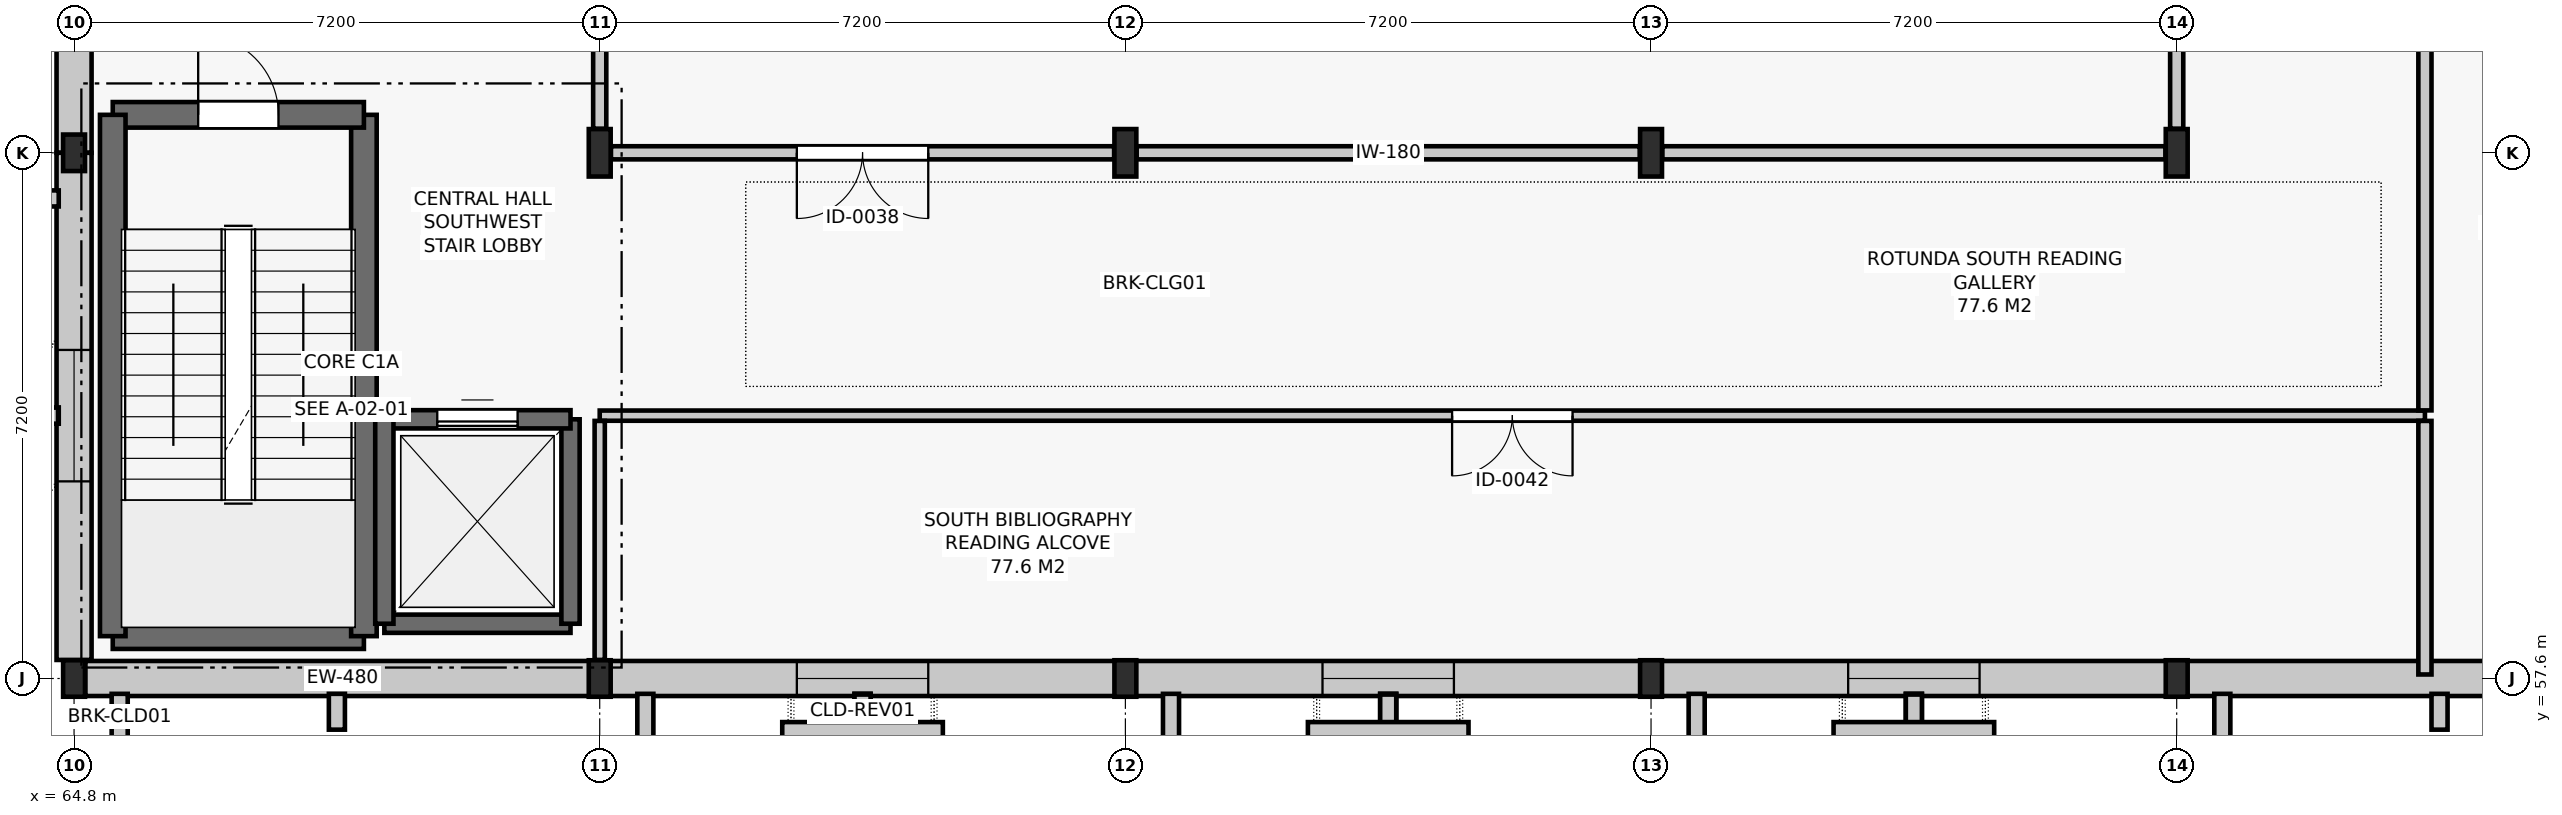
"""IFC4 building model, lengths in metres.
Left out: names, types, materials, properties, quantities, classifications, styles, units other than length and angle.
Written with IfcOpenShell. Run it as: python <this file> out.ifc"""

import sys

from ifc_helpers import new_model, si_unit, direction, frame, frame_2d, origin, origin_2d, place, context, subcontext, project, spatial, rectangle, i_section, extrude, element, fill, save


model = new_model("IFC4")
c1 = context("Model", 3, precision=1e-05, world=origin(), true_north=direction((0.0, 1.0)))
c2 = subcontext(c1, "Body", "Model", "MODEL_VIEW")
j1 = project(units=[si_unit("LENGTHUNIT", "METRE"), si_unit("PLANEANGLEUNIT", "RADIAN")], contexts=[c1])
p1 = place(None, origin())
s1 = spatial("IfcSite", under=j1, at=p1, CompositionType="ELEMENT")
p2 = place(p1, origin())
s2 = spatial("IfcBuilding", under=s1, at=p2, CompositionType="ELEMENT")
p3 = place(p2, frame((0.0, 0.0, 5.4)))
s3 = spatial("IfcBuildingStorey", under=s2, at=p3, CompositionType="ELEMENT", Elevation=5.4)
for number, where, z_axis, x_axis in (
    (1, (64.8, 57.6, 0.0), (0.0, 0.0, 1.0), (1.0, 0.0, 0.0)),
    (2, (64.8, 64.8, 0.0), (0.0, 0.0, 1.0), (1.0, 0.0, 0.0)),
    (3, (72.0, 57.6, 0.0), (0.0, 0.0, 1.0), (1.0, 0.0, 0.0)),
):
    element("IfcColumn", number, at=place(p3, frame(where, z_axis=z_axis, x_axis=x_axis)), inside=s3, PredefinedType="COLUMN", context=c2, shape_type="SweptSolid", body=[
        extrude(i_section(OverallWidth=0.3, OverallDepth=0.5, WebThickness=0.014, FlangeThickness=0.028, FilletRadius=0.027, at=origin_2d()), origin(), (0.0, 0.0, 1.0), 4.8),
    ])
p4 = place(p3, frame((72.0, 64.8, 0.0), z_axis=(0.0, 0.0, 1.0), x_axis=(1.0, 0.0, 0.0)))
e4 = element("IfcColumn", 4, at=p4, inside=s3, PredefinedType="COLUMN", context=c2, shape_type="SweptSolid", body=[
    extrude(i_section(OverallWidth=0.3, OverallDepth=0.65, WebThickness=0.016, FlangeThickness=0.031, FilletRadius=0.027, at=origin_2d()), origin(), (0.0, 0.0, 1.0), 4.8),
])
p5 = place(p3, frame((79.2, 57.6, 0.0), z_axis=(0.0, 0.0, 1.0), x_axis=(1.0, 0.0, 0.0)))
e5 = element("IfcColumn", 5, at=p5, inside=s3, PredefinedType="COLUMN", context=c2, shape_type="SweptSolid", body=[
    extrude(i_section(OverallWidth=0.3, OverallDepth=0.5, WebThickness=0.014, FlangeThickness=0.028, FilletRadius=0.027, at=origin_2d()), origin(), (0.0, 0.0, 1.0), 4.8),
])
p6 = place(p3, frame((79.2, 64.8, 0.0), z_axis=(0.0, 0.0, 1.0), x_axis=(1.0, 0.0, 0.0)))
e6 = element("IfcColumn", 6, at=p6, inside=s3, PredefinedType="COLUMN", context=c2, shape_type="SweptSolid", body=[
    extrude(i_section(OverallWidth=0.3, OverallDepth=0.65, WebThickness=0.016, FlangeThickness=0.031, FilletRadius=0.027, at=origin_2d()), origin(), (0.0, 0.0, 1.0), 4.8),
])
p7 = place(p3, frame((86.4, 57.6, 0.0), z_axis=(0.0, 0.0, 1.0), x_axis=(1.0, 0.0, 0.0)))
e7 = element("IfcColumn", 7, at=p7, inside=s3, PredefinedType="COLUMN", context=c2, shape_type="SweptSolid", body=[
    extrude(i_section(OverallWidth=0.3, OverallDepth=0.5, WebThickness=0.014, FlangeThickness=0.028, FilletRadius=0.027, at=origin_2d()), origin(), (0.0, 0.0, 1.0), 4.8),
])
p8 = place(p3, frame((86.4, 64.8, 0.0), z_axis=(0.0, 0.0, 1.0), x_axis=(1.0, 0.0, 0.0)))
e8 = element("IfcColumn", 8, at=p8, inside=s3, PredefinedType="COLUMN", context=c2, shape_type="SweptSolid", body=[
    extrude(i_section(OverallWidth=0.3, OverallDepth=0.65, WebThickness=0.016, FlangeThickness=0.031, FilletRadius=0.027, at=origin_2d()), origin(), (0.0, 0.0, 1.0), 4.8),
])
p9 = place(p3, frame((93.6, 57.6, 0.0), z_axis=(0.0, 0.0, 1.0), x_axis=(1.0, 0.0, 0.0)))
e9 = element("IfcColumn", 9, at=p9, inside=s3, PredefinedType="COLUMN", context=c2, shape_type="SweptSolid", body=[
    extrude(i_section(OverallWidth=0.3, OverallDepth=0.5, WebThickness=0.014, FlangeThickness=0.028, FilletRadius=0.027, at=origin_2d()), origin(), (0.0, 0.0, 1.0), 4.8),
])
p10 = place(p3, frame((93.6, 64.8, 0.0), z_axis=(0.0, 0.0, 1.0), x_axis=(1.0, 0.0, 0.0)))
e10 = element("IfcColumn", 10, at=p10, inside=s3, PredefinedType="COLUMN", context=c2, shape_type="SweptSolid", body=[
    extrude(i_section(OverallWidth=0.3, OverallDepth=0.65, WebThickness=0.016, FlangeThickness=0.031, FilletRadius=0.027, at=origin_2d()), origin(), (0.0, 0.0, 1.0), 4.8),
])
p11 = place(p3, frame((64.954, 57.6, 0.0), z_axis=(0.0, 0.0, 1.0), x_axis=(1.0, 0.0, 0.0)))
e11 = element("IfcWall", 11, at=p11, inside=s3, PredefinedType="SOLIDWALL", context=c2, shape_type="SweptSolid", body=[
    extrude(rectangle(XDim=7.046, YDim=0.48, at=frame_2d((3.523, 0.0))), origin(), (0.0, 0.0, 1.0), 3.8),
])
p12 = place(p3, frame((72.0, 57.6, 0.0), z_axis=(0.0, 0.0, 1.0), x_axis=(1.0, 0.0, 0.0)))
e12 = element("IfcWall", 12, at=p12, inside=s3, PredefinedType="SOLIDWALL", context=c2, shape_type="SweptSolid", body=[
    extrude(rectangle(XDim=7.2, YDim=0.48, at=frame_2d((3.6, 0.0))), origin(), (0.0, 0.0, 1.0), 3.8),
])
p13 = place(p12, frame((2.7, 0.0, 0.9)))
e13 = element("IfcOpeningElement", 13, at=p13, cuts=e12, PredefinedType="OPENING", context=c2, shape_type="SweptSolid", body=[
    extrude(rectangle(XDim=1.8, YDim=2.45, at=frame_2d((0.9, 1.225))), frame((0.0, 0.252, 0.0), z_axis=(0.0, -1.0, 0.0), x_axis=(1.0, 0.0, 0.0)), (0.0, 0.0, 1.0), 0.504),
])
p14 = place(p3, frame((79.2, 57.6, 0.0), z_axis=(0.0, 0.0, 1.0), x_axis=(1.0, 0.0, 0.0)))
e14 = element("IfcWall", 14, at=p14, inside=s3, PredefinedType="SOLIDWALL", context=c2, shape_type="SweptSolid", body=[
    extrude(rectangle(XDim=7.2, YDim=0.48, at=frame_2d((3.6, 0.0))), origin(), (0.0, 0.0, 1.0), 3.8),
])
p15 = place(p14, frame((2.7, 0.0, 0.9)))
e15 = element("IfcOpeningElement", 15, at=p15, cuts=e14, PredefinedType="OPENING", context=c2, shape_type="SweptSolid", body=[
    extrude(rectangle(XDim=1.8, YDim=2.45, at=frame_2d((0.9, 1.225))), frame((0.0, 0.252, 0.0), z_axis=(0.0, -1.0, 0.0), x_axis=(1.0, 0.0, 0.0)), (0.0, 0.0, 1.0), 0.504),
])
p16 = place(p3, frame((86.4, 57.6, 0.0), z_axis=(0.0, 0.0, 1.0), x_axis=(1.0, 0.0, 0.0)))
e16 = element("IfcWall", 16, at=p16, inside=s3, PredefinedType="SOLIDWALL", context=c2, shape_type="SweptSolid", body=[
    extrude(rectangle(XDim=7.2, YDim=0.48, at=frame_2d((3.6, 0.0))), origin(), (0.0, 0.0, 1.0), 3.8),
])
p17 = place(p16, frame((2.7, 0.0, 0.9)))
e17 = element("IfcOpeningElement", 17, at=p17, cuts=e16, PredefinedType="OPENING", context=c2, shape_type="SweptSolid", body=[
    extrude(rectangle(XDim=1.8, YDim=2.45, at=frame_2d((0.9, 1.225))), frame((0.0, 0.252, 0.0), z_axis=(0.0, -1.0, 0.0), x_axis=(1.0, 0.0, 0.0)), (0.0, 0.0, 1.0), 0.504),
])
p18 = place(p3, frame((93.6, 57.6, 0.0), z_axis=(0.0, 0.0, 1.0), x_axis=(1.0, 0.0, 0.0)))
e18 = element("IfcWall", 18, at=p18, inside=s3, PredefinedType="SOLIDWALL", context=c2, shape_type="SweptSolid", body=[
    extrude(rectangle(XDim=7.046, YDim=0.48, at=frame_2d((3.523, 0.0))), origin(), (0.0, 0.0, 1.0), 3.8),
])
p19 = place(p3, frame((64.8, 72.0, 0.0), z_axis=(0.0, 0.0, 1.0), x_axis=(0.0, -1.0, 0.0)))
e19 = element("IfcWall", 19, at=p19, inside=s3, PredefinedType="SOLIDWALL", context=c2, shape_type="SweptSolid", body=[
    extrude(rectangle(XDim=7.2, YDim=0.48, at=frame_2d((3.6, 0.0))), origin(), (0.0, 0.0, 1.0), 3.8),
])
p20 = place(p19, frame((2.7, 0.0, 0.9)))
e20 = element("IfcOpeningElement", 20, at=p20, cuts=e19, PredefinedType="OPENING", context=c2, shape_type="SweptSolid", body=[
    extrude(rectangle(XDim=1.8, YDim=2.45, at=frame_2d((0.9, 1.225))), frame((0.0, 0.252, 0.0), z_axis=(0.0, -1.0, 0.0), x_axis=(1.0, 0.0, 0.0)), (0.0, 0.0, 1.0), 0.504),
])
p21 = place(p3, frame((64.8, 64.8, 0.0), z_axis=(0.0, 0.0, 1.0), x_axis=(0.0, -1.0, 0.0)))
e21 = element("IfcWall", 21, at=p21, inside=s3, PredefinedType="SOLIDWALL", context=c2, shape_type="SweptSolid", body=[
    extrude(rectangle(XDim=6.946, YDim=0.48, at=frame_2d((3.473, 0.0))), origin(), (0.0, 0.0, 1.0), 3.8),
])
p22 = place(p21, frame((2.7, 0.0, 0.9)))
e22 = element("IfcOpeningElement", 22, at=p22, cuts=e21, PredefinedType="OPENING", context=c2, shape_type="SweptSolid", body=[
    extrude(rectangle(XDim=1.8, YDim=2.45, at=frame_2d((0.9, 1.225))), frame((0.0, 0.252, 0.0), z_axis=(0.0, -1.0, 0.0), x_axis=(1.0, 0.0, 0.0)), (0.0, 0.0, 1.0), 0.504),
])
p23 = place(p3, frame((65.33, 58.18, 0.0), z_axis=(0.0, 0.0, 1.0), x_axis=(1.0, 0.0, 0.0)))
e23 = element("IfcWall", 23, at=p23, inside=s3, PredefinedType="SHEAR", context=c2, shape_type="SweptSolid", body=[
    extrude(rectangle(XDim=3.44, YDim=0.35, at=frame_2d((1.72, 0.0))), origin(), (0.0, 0.0, 1.0), 4.52),
])
p24 = place(p3, frame((68.77, 58.18, 0.0), z_axis=(0.0, 0.0, 1.0), x_axis=(0.0, 1.0, 0.0)))
e24 = element("IfcWall", 24, at=p24, inside=s3, PredefinedType="SHEAR", context=c2, shape_type="SweptSolid", body=[
    extrude(rectangle(XDim=7.14, YDim=0.35, at=frame_2d((3.57, 0.0))), origin(), (0.0, 0.0, 1.0), 4.52),
])
p25 = place(p3, frame((68.77, 65.32, 0.0), z_axis=(0.0, 0.0, 1.0), x_axis=(-1.0, 0.0, 0.0)))
e25 = element("IfcWall", 25, at=p25, inside=s3, PredefinedType="SHEAR", context=c2, shape_type="SweptSolid", body=[
    extrude(rectangle(XDim=3.44, YDim=0.35, at=frame_2d((1.72, 0.0))), origin(), (0.0, 0.0, 1.0), 4.52),
])
p26 = place(p25, frame((1.17, 0.0, 0.0)))
e26 = element("IfcOpeningElement", 26, at=p26, cuts=e25, PredefinedType="OPENING", context=c2, shape_type="SweptSolid", body=[
    extrude(rectangle(XDim=1.1, YDim=2.15, at=frame_2d((0.55, 1.075))), frame((0.0, 0.187, 0.0), z_axis=(0.0, -1.0, 0.0), x_axis=(1.0, 0.0, 0.0)), (0.0, 0.0, 1.0), 0.374),
])
p27 = place(p3, frame((65.33, 65.32, 0.0), z_axis=(0.0, 0.0, 1.0), x_axis=(0.0, -1.0, 0.0)))
e27 = element("IfcWall", 27, at=p27, inside=s3, PredefinedType="SHEAR", context=c2, shape_type="SweptSolid", body=[
    extrude(rectangle(XDim=7.14, YDim=0.35, at=frame_2d((3.57, 0.0))), origin(), (0.0, 0.0, 1.0), 4.52),
])
p28 = place(p3, frame((69.05, 58.35, 0.0), z_axis=(0.0, 0.0, 1.0), x_axis=(1.0, 0.0, 0.0)))
e28 = element("IfcWall", 28, at=p28, inside=s3, PredefinedType="SHEAR", context=c2, shape_type="SweptSolid", body=[
    extrude(rectangle(XDim=2.55, YDim=0.25, at=frame_2d((1.275, 0.0))), origin(), (0.0, 0.0, 1.0), 4.52),
])
p29 = place(p3, frame((71.6, 58.35, 0.0), z_axis=(0.0, 0.0, 1.0), x_axis=(0.0, 1.0, 0.0)))
e29 = element("IfcWall", 29, at=p29, inside=s3, PredefinedType="SHEAR", context=c2, shape_type="SweptSolid", body=[
    extrude(rectangle(XDim=2.8, YDim=0.25, at=frame_2d((1.4, 0.0))), origin(), (0.0, 0.0, 1.0), 4.52),
])
p30 = place(p3, frame((71.6, 61.15, 0.0), z_axis=(0.0, 0.0, 1.0), x_axis=(-1.0, 0.0, 0.0)))
e30 = element("IfcWall", 30, at=p30, inside=s3, PredefinedType="SHEAR", context=c2, shape_type="SweptSolid", body=[
    extrude(rectangle(XDim=2.55, YDim=0.25, at=frame_2d((1.275, 0.0))), origin(), (0.0, 0.0, 1.0), 4.52),
])
p31 = place(p30, frame((0.725, 0.0, 0.0)))
e31 = element("IfcOpeningElement", 31, at=p31, cuts=e30, PredefinedType="OPENING", context=c2, shape_type="SweptSolid", body=[
    extrude(rectangle(XDim=1.1, YDim=2.1, at=frame_2d((0.55, 1.05))), frame((0.0, 0.137, 0.0), z_axis=(0.0, -1.0, 0.0), x_axis=(1.0, 0.0, 0.0)), (0.0, 0.0, 1.0), 0.274),
])
p32 = place(p3, frame((69.05, 61.15, 0.0), z_axis=(0.0, 0.0, 1.0), x_axis=(0.0, -1.0, 0.0)))
e32 = element("IfcWall", 32, at=p32, inside=s3, PredefinedType="SHEAR", context=c2, shape_type="SweptSolid", body=[
    extrude(rectangle(XDim=2.8, YDim=0.25, at=frame_2d((1.4, 0.0))), origin(), (0.0, 0.0, 1.0), 4.52),
])
p33 = place(p3, frame((72.154, 64.8, 0.0), z_axis=(0.0, 0.0, 1.0), x_axis=(1.0, 0.0, 0.0)))
e33 = element("IfcWall", 33, at=p33, inside=s3, PredefinedType="PARTITIONING", context=c2, shape_type="SweptSolid", body=[
    extrude(rectangle(XDim=6.892, YDim=0.18, at=frame_2d((3.446, 0.0))), origin(), (0.0, 0.0, 1.0), 4.505),
])
p34 = place(p33, frame((2.546, 0.0, 0.0)))
e34 = element("IfcOpeningElement", 34, at=p34, cuts=e33, PredefinedType="OPENING", context=c2, shape_type="SweptSolid", body=[
    extrude(rectangle(XDim=1.8, YDim=2.35, at=frame_2d((0.9, 1.175))), frame((0.0, 0.102, 0.0), z_axis=(0.0, -1.0, 0.0), x_axis=(1.0, 0.0, 0.0)), (0.0, 0.0, 1.0), 0.204),
])
for number, where, z_axis, x_axis in (
    (35, (79.354, 64.8, 0.0), (0.0, 0.0, 1.0), (1.0, 0.0, 0.0)),
    (36, (86.554, 64.8, 0.0), (0.0, 0.0, 1.0), (1.0, 0.0, 0.0)),
):
    element("IfcWall", number, at=place(p3, frame(where, z_axis=z_axis, x_axis=x_axis)), inside=s3, PredefinedType="PARTITIONING", context=c2, shape_type="SweptSolid", body=[
        extrude(rectangle(XDim=6.892, YDim=0.18, at=frame_2d((3.446, 0.0))), origin(), (0.0, 0.0, 1.0), 4.505),
    ])
p35 = place(p3, frame((72.0, 61.2, 0.0), z_axis=(0.0, 0.0, 1.0), x_axis=(1.0, 0.0, 0.0)))
e37 = element("IfcWall", 37, at=p35, inside=s3, PredefinedType="PARTITIONING", context=c2, shape_type="SweptSolid", body=[
    extrude(rectangle(XDim=25.0, YDim=0.14, at=frame_2d((12.5, 0.0))), origin(), (0.0, 0.0, 1.0), 4.065),
])
p36 = place(p35, frame((11.675, 0.0, 0.0)))
e38 = element("IfcOpeningElement", 38, at=p36, cuts=e37, PredefinedType="OPENING", context=c2, shape_type="SweptSolid", body=[
    extrude(rectangle(XDim=1.65, YDim=2.25, at=frame_2d((0.825, 1.125))), frame((0.0, 0.082, 0.0), z_axis=(0.0, -1.0, 0.0), x_axis=(1.0, 0.0, 0.0)), (0.0, 0.0, 1.0), 0.164),
])
p37 = place(p3, frame((97.0, 57.655, 0.0), z_axis=(0.0, 0.0, 1.0), x_axis=(0.0, 1.0, 0.0)))
e39 = element("IfcWall", 39, at=p37, inside=s3, PredefinedType="PARTITIONING", context=c2, shape_type="SweptSolid", body=[
    extrude(rectangle(XDim=3.473, YDim=0.18, at=frame_2d((1.736, 0.0))), origin(), (0.0, 0.0, 1.0), 3.955),
])
p38 = place(p3, frame((97.0, 61.272, 0.0), z_axis=(0.0, 0.0, 1.0), x_axis=(0.0, 1.0, 0.0)))
e40 = element("IfcWall", 40, at=p38, inside=s3, PredefinedType="PARTITIONING", context=c2, shape_type="SweptSolid", body=[
    extrude(rectangle(XDim=17.836, YDim=0.18, at=frame_2d((8.918, 0.0))), origin(), (0.0, 0.0, 1.0), 4.055),
])
p39 = place(p38, frame((9.737, 0.0, 0.0)))
e41 = element("IfcOpeningElement", 41, at=p39, cuts=e40, PredefinedType="OPENING", context=c2, shape_type="SweptSolid", body=[
    extrude(rectangle(XDim=1.65, YDim=2.25, at=frame_2d((0.825, 1.125))), frame((0.0, 0.102, 0.0), z_axis=(0.0, -1.0, 0.0), x_axis=(1.0, 0.0, 0.0)), (0.0, 0.0, 1.0), 0.204),
])
for number, where, z_axis, x_axis in (
    (42, (72.0, 65.129, 0.0), (0.0, 0.0, 1.0), (0.0, 1.0, 0.0)),
    (43, (93.6, 65.129, 0.0), (0.0, 0.0, 1.0), (0.0, 1.0, 0.0)),
):
    element("IfcWall", number, at=place(p3, frame(where, z_axis=z_axis, x_axis=x_axis)), inside=s3, PredefinedType="PARTITIONING", context=c2, shape_type="SweptSolid", body=[
        extrude(rectangle(XDim=6.542, YDim=0.18, at=frame_2d((3.271, 0.0))), origin(), (0.0, 0.0, 1.0), 4.505),
    ])
p40 = place(p3, frame((72.0, 57.854, 0.0), z_axis=(0.0, 0.0, 1.0), x_axis=(0.0, 1.0, 0.0)))
e44 = element("IfcWall", 44, at=p40, inside=s3, PredefinedType="PARTITIONING", context=c2, shape_type="SweptSolid", body=[
    extrude(rectangle(XDim=3.274, YDim=0.14, at=frame_2d((1.637, 0.0))), origin(), (0.0, 0.0, 1.0), 4.065),
])
p41 = place(p13, origin())
e45 = element("IfcWindow", 45, at=p41, inside=s3, PartitioningType="SINGLE_PANEL", PredefinedType="WINDOW", context=c2, shape_type="SweptSolid", body=[
    extrude(rectangle(XDim=1.8, YDim=2.45, at=frame_2d((0.9, 1.225))), frame((0.0, 0.03, 0.0), z_axis=(0.0, -1.0, 0.0), x_axis=(1.0, 0.0, 0.0)), (0.0, 0.0, 1.0), 0.06),
])
fill(e13, e45)
p42 = place(p15, origin())
e46 = element("IfcWindow", 46, at=p42, inside=s3, PartitioningType="SINGLE_PANEL", PredefinedType="WINDOW", context=c2, shape_type="SweptSolid", body=[
    extrude(rectangle(XDim=1.8, YDim=2.45, at=frame_2d((0.9, 1.225))), frame((0.0, 0.03, 0.0), z_axis=(0.0, -1.0, 0.0), x_axis=(1.0, 0.0, 0.0)), (0.0, 0.0, 1.0), 0.06),
])
fill(e15, e46)
p43 = place(p17, origin())
e47 = element("IfcWindow", 47, at=p43, inside=s3, PartitioningType="SINGLE_PANEL", PredefinedType="WINDOW", context=c2, shape_type="SweptSolid", body=[
    extrude(rectangle(XDim=1.8, YDim=2.45, at=frame_2d((0.9, 1.225))), frame((0.0, 0.03, 0.0), z_axis=(0.0, -1.0, 0.0), x_axis=(1.0, 0.0, 0.0)), (0.0, 0.0, 1.0), 0.06),
])
fill(e17, e47)
p44 = place(p22, origin())
e48 = element("IfcWindow", 48, at=p44, inside=s3, PartitioningType="SINGLE_PANEL", PredefinedType="WINDOW", context=c2, shape_type="SweptSolid", body=[
    extrude(rectangle(XDim=1.8, YDim=2.45, at=frame_2d((0.9, 1.225))), frame((0.0, 0.03, 0.0), z_axis=(0.0, -1.0, 0.0), x_axis=(1.0, 0.0, 0.0)), (0.0, 0.0, 1.0), 0.06),
])
fill(e22, e48)
p45 = place(p26, frame((1.1, 0.0, 0.0), z_axis=(0.0, 0.0, 1.0), x_axis=(-1.0, 0.0, 0.0)))
e49 = element("IfcDoor", 49, at=p45, inside=s3, OperationType="SINGLE_SWING_LEFT", PredefinedType="DOOR", context=c2, shape_type="SweptSolid", body=[
    extrude(rectangle(XDim=1.1, YDim=2.15, at=frame_2d((0.55, 1.075))), frame((0.0, 0.025, 0.0), z_axis=(0.0, -1.0, 0.0), x_axis=(1.0, 0.0, 0.0)), (0.0, 0.0, 1.0), 0.05),
])
fill(e26, e49)
p46 = place(p31, origin())
e50 = element("IfcDoor", 50, at=p46, inside=s3, OperationType="SLIDING_TO_LEFT", PredefinedType="DOOR", context=c2, shape_type="SweptSolid", body=[
    extrude(rectangle(XDim=1.1, YDim=2.1, at=frame_2d((0.55, 1.05))), frame((0.0, 0.025, 0.0), z_axis=(0.0, -1.0, 0.0), x_axis=(1.0, 0.0, 0.0)), (0.0, 0.0, 1.0), 0.05),
])
fill(e31, e50)
p47 = place(p34, frame((1.8, 0.0, 0.0), z_axis=(0.0, 0.0, 1.0), x_axis=(-1.0, 0.0, 0.0)))
e51 = element("IfcDoor", 51, at=p47, inside=s3, OperationType="DOUBLE_DOOR_SINGLE_SWING", PredefinedType="DOOR", context=c2, shape_type="SweptSolid", body=[
    extrude(rectangle(XDim=1.8, YDim=2.35, at=frame_2d((0.9, 1.175))), frame((0.0, 0.025, 0.0), z_axis=(0.0, -1.0, 0.0), x_axis=(1.0, 0.0, 0.0)), (0.0, 0.0, 1.0), 0.05),
])
fill(e34, e51)
p48 = place(p36, frame((1.65, 0.0, 0.0), z_axis=(0.0, 0.0, 1.0), x_axis=(-1.0, 0.0, 0.0)))
e52 = element("IfcDoor", 52, at=p48, inside=s3, OperationType="DOUBLE_DOOR_SINGLE_SWING", PredefinedType="DOOR", context=c2, shape_type="SweptSolid", body=[
    extrude(rectangle(XDim=1.65, YDim=2.25, at=frame_2d((0.825, 1.125))), frame((0.0, 0.025, 0.0), z_axis=(0.0, -1.0, 0.0), x_axis=(1.0, 0.0, 0.0)), (0.0, 0.0, 1.0), 0.05),
])
fill(e38, e52)
save(model, sys.argv[1])
